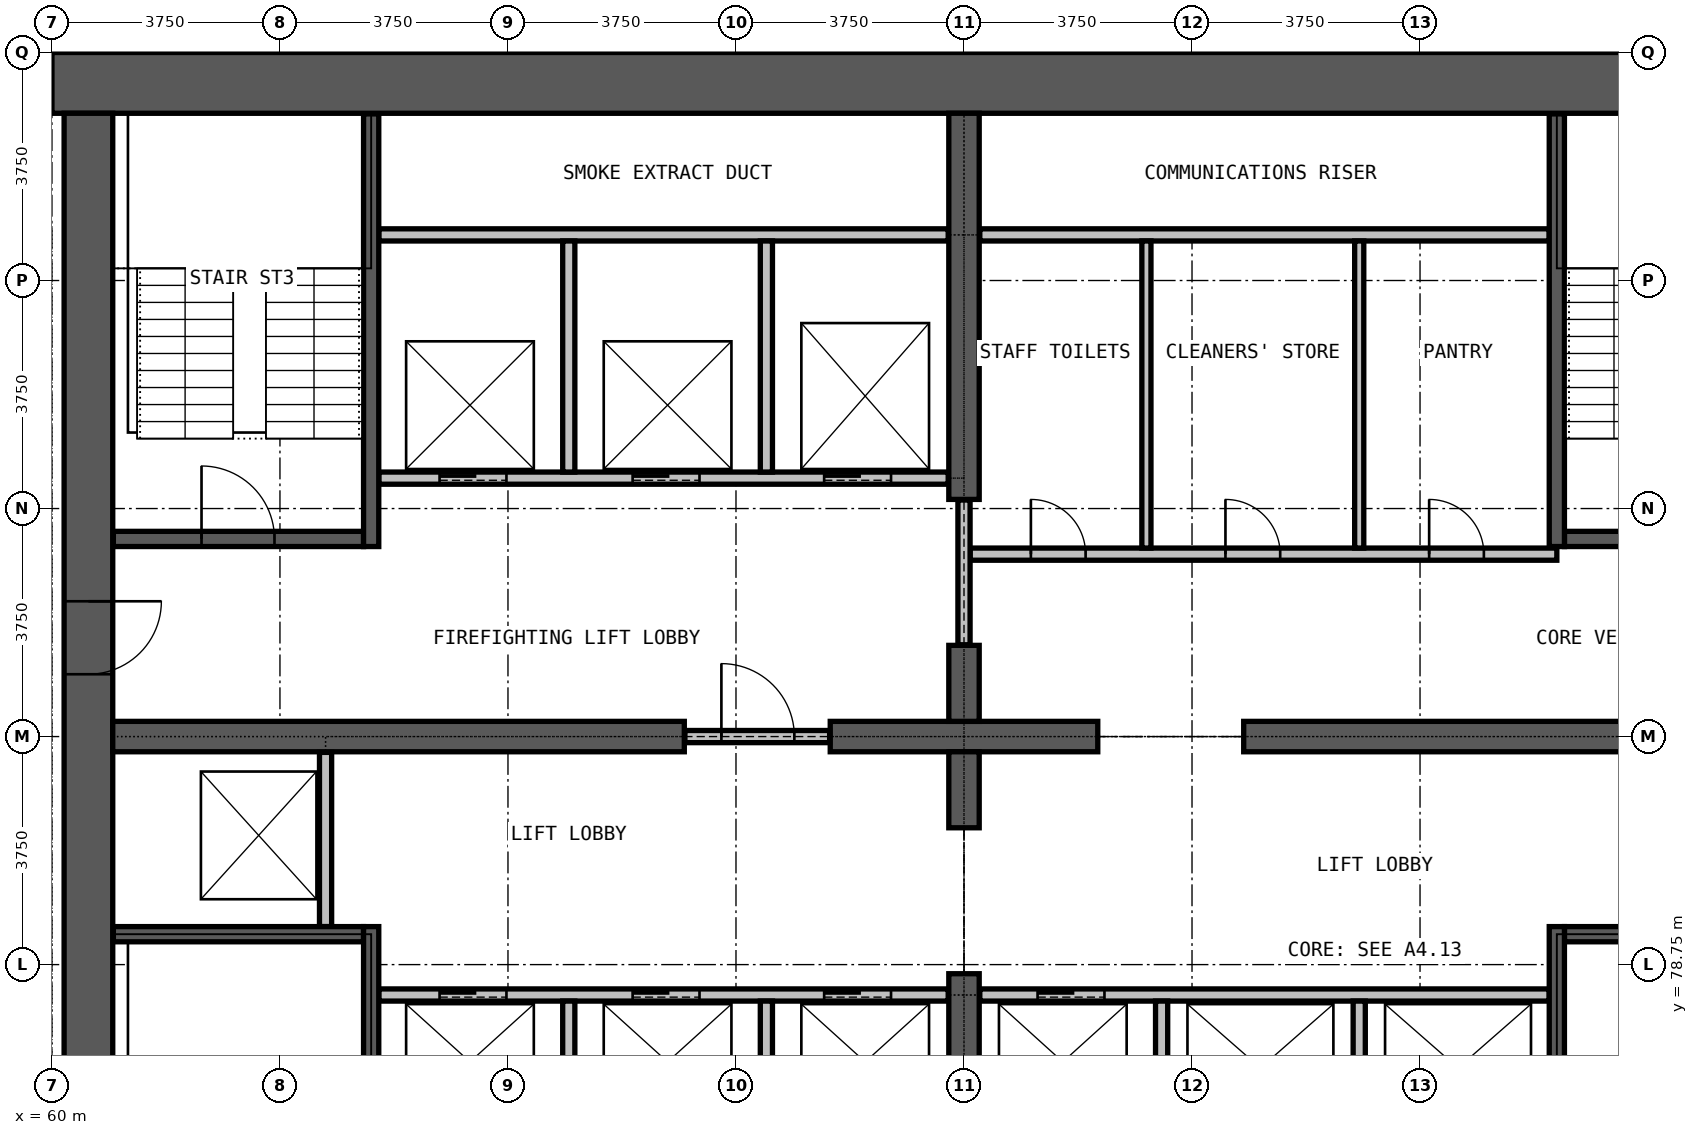
"""IFC4 building model, lengths in metres.
Left out: names, types, materials, properties, quantities, classifications, styles, units other than length and angle.
Written with IfcOpenShell. Run it as: python <this file> out.ifc"""

import sys

from ifc_helpers import new_model, si_unit, direction, frame, frame_2d, origin, place, context, subcontext, project, spatial, rectangle, extrude, element, fill, save


model = new_model("IFC4")
c1 = context("Model", 3, precision=1e-05, world=origin(), true_north=direction((0.0, 1.0)))
c2 = subcontext(c1, "Body", "Model", "MODEL_VIEW")
j1 = project(units=[si_unit("LENGTHUNIT", "METRE"), si_unit("PLANEANGLEUNIT", "RADIAN")], contexts=[c1])
p1 = place(None, origin())
s1 = spatial("IfcSite", under=j1, at=p1, CompositionType="ELEMENT")
p2 = place(p1, origin())
s2 = spatial("IfcBuilding", under=s1, at=p2, CompositionType="ELEMENT")
p3 = place(p2, frame((0.0, 0.0, 118.0)))
s3 = spatial("IfcBuildingStorey", under=s2, at=p3, CompositionType="ELEMENT", Elevation=118.0)
p4 = place(p3, frame((90.0, 93.25, 0.0), z_axis=(0.0, 0.0, 1.0), x_axis=(-1.0, 0.0, 0.0)))
e1 = element("IfcWall", 1, at=p4, inside=s3, PredefinedType="SHEAR", context=c2, shape_type="SweptSolid", body=[
    extrude(rectangle(XDim=30.0, YDim=1.0, at=frame_2d((15.0, 0.0))), origin(), (0.0, 0.0, 1.0), 3.6),
])
p5 = place(p3, frame((60.6, 92.75, 0.0), z_axis=(0.0, 0.0, 1.0), x_axis=(0.0, -1.0, 0.0)))
e2 = element("IfcWall", 2, at=p5, inside=s3, PredefinedType="SHEAR", context=c2, shape_type="SweptSolid", body=[
    extrude(rectangle(XDim=20.5, YDim=0.8, at=frame_2d((10.25, 0.0))), origin(), (0.0, 0.0, 1.0), 3.6),
])
p6 = place(p5, frame((19.025, 0.0, 0.0)))
e3 = element("IfcOpeningElement", 3, at=p6, cuts=e2, PredefinedType="OPENING", context=c2, shape_type="SweptSolid", body=[
    extrude(rectangle(XDim=1.2, YDim=2.2, at=frame_2d((0.6, 1.1))), frame((0.0, 0.41, 0.0), z_axis=(0.0, -1.0, 0.0), x_axis=(1.0, 0.0, 0.0)), (0.0, 0.0, 1.0), 0.82),
])
p7 = place(p5, frame((8.025, 0.0, 0.0)))
e4 = element("IfcOpeningElement", 4, at=p7, cuts=e2, PredefinedType="OPENING", context=c2, shape_type="SweptSolid", body=[
    extrude(rectangle(XDim=1.2, YDim=2.2, at=frame_2d((0.6, 1.1))), frame((0.0, 0.41, 0.0), z_axis=(0.0, -1.0, 0.0), x_axis=(1.0, 0.0, 0.0)), (0.0, 0.0, 1.0), 0.82),
])
p8 = place(p3, frame((61.0, 82.5, 0.0), z_axis=(0.0, 0.0, 1.0), x_axis=(1.0, 0.0, 0.0)))
e5 = element("IfcWall", 5, at=p8, inside=s3, PredefinedType="SHEAR", context=c2, shape_type="SweptSolid", body=[
    extrude(rectangle(XDim=9.4, YDim=0.5, at=frame_2d((4.7, 0.0))), origin(), (0.0, 0.0, 1.0), 3.6),
])
p9 = place(p3, frame((72.8, 82.5, 0.0), z_axis=(0.0, 0.0, 1.0), x_axis=(1.0, 0.0, 0.0)))
e6 = element("IfcWall", 6, at=p9, inside=s3, PredefinedType="SHEAR", context=c2, shape_type="SweptSolid", body=[
    extrude(rectangle(XDim=4.4, YDim=0.5, at=frame_2d((2.2, 0.0))), origin(), (0.0, 0.0, 1.0), 3.6),
])
p10 = place(p3, frame((79.6, 82.5, 0.0), z_axis=(0.0, 0.0, 1.0), x_axis=(1.0, 0.0, 0.0)))
e7 = element("IfcWall", 7, at=p10, inside=s3, PredefinedType="SHEAR", context=c2, shape_type="SweptSolid", body=[
    extrude(rectangle(XDim=9.4, YDim=0.5, at=frame_2d((4.7, 0.0))), origin(), (0.0, 0.0, 1.0), 3.6),
])
p11 = place(p3, frame((75.0, 72.25, 0.0), z_axis=(0.0, 0.0, 1.0), x_axis=(0.0, 1.0, 0.0)))
e8 = element("IfcWall", 8, at=p11, inside=s3, PredefinedType="SHEAR", context=c2, shape_type="SweptSolid", body=[
    extrude(rectangle(XDim=6.35, YDim=0.5, at=frame_2d((3.175, 0.0))), origin(), (0.0, 0.0, 1.0), 3.6),
])
for number, where, z_axis, x_axis in (
    (9, (75.0, 81.0, 0.0), (0.0, 0.0, 1.0), (0.0, 1.0, 0.0)),
    (10, (75.0, 82.75, 0.0), (0.0, 0.0, 1.0), (0.0, 1.0, 0.0)),
):
    element("IfcWall", number, at=place(p3, frame(where, z_axis=z_axis, x_axis=x_axis)), inside=s3, PredefinedType="SHEAR", context=c2, shape_type="SweptSolid", body=[
        extrude(rectangle(XDim=1.25, YDim=0.5, at=frame_2d((0.625, 0.0))), origin(), (0.0, 0.0, 1.0), 3.6),
    ])
p12 = place(p3, frame((75.0, 86.4, 0.0), z_axis=(0.0, 0.0, 1.0), x_axis=(0.0, 1.0, 0.0)))
e11 = element("IfcWall", 11, at=p12, inside=s3, PredefinedType="SHEAR", context=c2, shape_type="SweptSolid", body=[
    extrude(rectangle(XDim=6.35, YDim=0.5, at=frame_2d((3.175, 0.0))), origin(), (0.0, 0.0, 1.0), 3.6),
])
p13 = place(p3, frame((70.41, 82.5, 0.0), z_axis=(0.0, 0.0, 1.0), x_axis=(1.0, 0.0, 0.0)))
e12 = element("IfcWall", 12, at=p13, inside=s3, PredefinedType="PARTITIONING", context=c2, shape_type="SweptSolid", body=[
    extrude(rectangle(XDim=2.38, YDim=0.2, at=frame_2d((1.19, 0.0))), origin(), (0.0, 0.0, 1.0), 2.4),
])
p14 = place(p13, frame((0.6, 0.0, 0.0)))
e13 = element("IfcOpeningElement", 13, at=p14, cuts=e12, PredefinedType="OPENING", context=c2, shape_type="SweptSolid", body=[
    extrude(rectangle(XDim=1.2, YDim=2.2, at=frame_2d((0.6, 1.1))), frame((0.0, 0.11, 0.0), z_axis=(0.0, -1.0, 0.0), x_axis=(1.0, 0.0, 0.0)), (0.0, 0.0, 1.0), 0.22),
])
p15 = place(p3, frame((75.1, 85.5, 0.0), z_axis=(0.0, 0.0, 1.0), x_axis=(1.0, 0.0, 0.0)))
e14 = element("IfcWall", 14, at=p15, inside=s3, PredefinedType="PARTITIONING", context=c2, shape_type="SweptSolid", body=[
    extrude(rectangle(XDim=9.65, YDim=0.2, at=frame_2d((4.825, 0.0))), origin(), (0.0, 0.0, 1.0), 3.3),
])
p16 = place(p15, frame((1.0, 0.0, 0.0)))
e15 = element("IfcOpeningElement", 15, at=p16, cuts=e14, PredefinedType="OPENING", context=c2, shape_type="SweptSolid", body=[
    extrude(rectangle(XDim=0.9, YDim=2.2, at=frame_2d((0.45, 1.1))), frame((0.0, 0.11, 0.0), z_axis=(0.0, -1.0, 0.0), x_axis=(1.0, 0.0, 0.0)), (0.0, 0.0, 1.0), 0.22),
])
p17 = place(p15, frame((4.2, 0.0, 0.0)))
e16 = element("IfcOpeningElement", 16, at=p17, cuts=e14, PredefinedType="OPENING", context=c2, shape_type="SweptSolid", body=[
    extrude(rectangle(XDim=0.9, YDim=2.2, at=frame_2d((0.45, 1.1))), frame((0.0, 0.11, 0.0), z_axis=(0.0, -1.0, 0.0), x_axis=(1.0, 0.0, 0.0)), (0.0, 0.0, 1.0), 0.22),
])
p18 = place(p15, frame((7.55, 0.0, 0.0)))
e17 = element("IfcOpeningElement", 17, at=p18, cuts=e14, PredefinedType="OPENING", context=c2, shape_type="SweptSolid", body=[
    extrude(rectangle(XDim=0.9, YDim=2.2, at=frame_2d((0.45, 1.1))), frame((0.0, 0.11, 0.0), z_axis=(0.0, -1.0, 0.0), x_axis=(1.0, 0.0, 0.0)), (0.0, 0.0, 1.0), 0.22),
])
p19 = place(p3, frame((75.26, 90.75, 0.0), z_axis=(0.0, 0.0, 1.0), x_axis=(1.0, 0.0, 0.0)))
e18 = element("IfcWall", 18, at=p19, inside=s3, PredefinedType="PARTITIONING", context=c2, shape_type="SweptSolid", body=[
    extrude(rectangle(XDim=9.365, YDim=0.2, at=frame_2d((4.683, 0.0))), origin(), (0.0, 0.0, 1.0), 3.3),
])
p20 = place(p3, frame((75.0, 84.01, 0.0), z_axis=(0.0, 0.0, 1.0), x_axis=(0.0, 1.0, 0.0)))
e19 = element("IfcWall", 19, at=p20, inside=s3, PredefinedType="PARTITIONING", context=c2, shape_type="SweptSolid", body=[
    extrude(rectangle(XDim=2.38, YDim=0.2, at=frame_2d((1.19, 0.0))), origin(), (0.0, 0.0, 1.0), 2.4),
])
for number, where, z_axis, x_axis in (
    (20, (78.0, 85.6, 0.0), (0.0, 0.0, 1.0), (0.0, 1.0, 0.0)),
    (21, (81.5, 85.6, 0.0), (0.0, 0.0, 1.0), (0.0, 1.0, 0.0)),
):
    element("IfcWall", number, at=place(p3, frame(where, z_axis=z_axis, x_axis=x_axis)), inside=s3, PredefinedType="PARTITIONING", context=c2, shape_type="SweptSolid", body=[
        extrude(rectangle(XDim=5.05, YDim=0.15, at=frame_2d((2.525, 0.0))), origin(), (0.0, 0.0, 1.0), 3.3),
    ])
p21 = place(p3, frame((65.375, 78.25, 0.0), z_axis=(0.0, 0.0, 1.0), x_axis=(1.0, 0.0, 0.0)))
e22 = element("IfcWall", 22, at=p21, inside=s3, PredefinedType="PARTITIONING", context=c2, shape_type="SweptSolid", body=[
    extrude(rectangle(XDim=9.365, YDim=0.2, at=frame_2d((4.683, 0.0))), origin(), (0.0, 0.0, 1.0), 3.3),
])
p22 = place(p21, frame((1.0, 0.0, 0.0)))
e23 = element("IfcOpeningElement", 23, at=p22, cuts=e22, PredefinedType="OPENING", context=c2, shape_type="SweptSolid", body=[
    extrude(rectangle(XDim=1.1, YDim=2.2, at=frame_2d((0.55, 1.1))), frame((0.0, 0.11, 0.0), z_axis=(0.0, -1.0, 0.0), x_axis=(1.0, 0.0, 0.0)), (0.0, 0.0, 1.0), 0.22),
])
p23 = place(p21, frame((4.175, 0.0, 0.0)))
e24 = element("IfcOpeningElement", 24, at=p23, cuts=e22, PredefinedType="OPENING", context=c2, shape_type="SweptSolid", body=[
    extrude(rectangle(XDim=1.1, YDim=2.2, at=frame_2d((0.55, 1.1))), frame((0.0, 0.11, 0.0), z_axis=(0.0, -1.0, 0.0), x_axis=(1.0, 0.0, 0.0)), (0.0, 0.0, 1.0), 0.22),
])
p24 = place(p21, frame((7.325, 0.0, 0.0)))
e25 = element("IfcOpeningElement", 25, at=p24, cuts=e22, PredefinedType="OPENING", context=c2, shape_type="SweptSolid", body=[
    extrude(rectangle(XDim=1.1, YDim=2.2, at=frame_2d((0.55, 1.1))), frame((0.0, 0.11, 0.0), z_axis=(0.0, -1.0, 0.0), x_axis=(1.0, 0.0, 0.0)), (0.0, 0.0, 1.0), 0.22),
])
p25 = place(p3, frame((75.26, 78.25, 0.0), z_axis=(0.0, 0.0, 1.0), x_axis=(1.0, 0.0, 0.0)))
e26 = element("IfcWall", 26, at=p25, inside=s3, PredefinedType="PARTITIONING", context=c2, shape_type="SweptSolid", body=[
    extrude(rectangle(XDim=9.365, YDim=0.2, at=frame_2d((4.683, 0.0))), origin(), (0.0, 0.0, 1.0), 3.3),
])
p26 = place(p25, frame((0.95, 0.0, 0.0)))
e27 = element("IfcOpeningElement", 27, at=p26, cuts=e26, PredefinedType="OPENING", context=c2, shape_type="SweptSolid", body=[
    extrude(rectangle(XDim=1.1, YDim=2.2, at=frame_2d((0.55, 1.1))), frame((0.0, 0.11, 0.0), z_axis=(0.0, -1.0, 0.0), x_axis=(1.0, 0.0, 0.0)), (0.0, 0.0, 1.0), 0.22),
])
p27 = place(p3, frame((65.375, 86.75, 0.0), z_axis=(0.0, 0.0, 1.0), x_axis=(1.0, 0.0, 0.0)))
e28 = element("IfcWall", 28, at=p27, inside=s3, PredefinedType="PARTITIONING", context=c2, shape_type="SweptSolid", body=[
    extrude(rectangle(XDim=9.365, YDim=0.2, at=frame_2d((4.683, 0.0))), origin(), (0.0, 0.0, 1.0), 3.3),
])
p28 = place(p27, frame((1.0, 0.0, 0.0)))
e29 = element("IfcOpeningElement", 29, at=p28, cuts=e28, PredefinedType="OPENING", context=c2, shape_type="SweptSolid", body=[
    extrude(rectangle(XDim=1.1, YDim=2.2, at=frame_2d((0.55, 1.1))), frame((0.0, 0.11, 0.0), z_axis=(0.0, -1.0, 0.0), x_axis=(1.0, 0.0, 0.0)), (0.0, 0.0, 1.0), 0.22),
])
p29 = place(p27, frame((4.175, 0.0, 0.0)))
e30 = element("IfcOpeningElement", 30, at=p29, cuts=e28, PredefinedType="OPENING", context=c2, shape_type="SweptSolid", body=[
    extrude(rectangle(XDim=1.1, YDim=2.2, at=frame_2d((0.55, 1.1))), frame((0.0, 0.11, 0.0), z_axis=(0.0, -1.0, 0.0), x_axis=(1.0, 0.0, 0.0)), (0.0, 0.0, 1.0), 0.22),
])
p30 = place(p27, frame((7.325, 0.0, 0.0)))
e31 = element("IfcOpeningElement", 31, at=p30, cuts=e28, PredefinedType="OPENING", context=c2, shape_type="SweptSolid", body=[
    extrude(rectangle(XDim=1.1, YDim=2.2, at=frame_2d((0.55, 1.1))), frame((0.0, 0.11, 0.0), z_axis=(0.0, -1.0, 0.0), x_axis=(1.0, 0.0, 0.0)), (0.0, 0.0, 1.0), 0.22),
])
p31 = place(p3, frame((65.375, 90.75, 0.0), z_axis=(0.0, 0.0, 1.0), x_axis=(1.0, 0.0, 0.0)))
e32 = element("IfcWall", 32, at=p31, inside=s3, PredefinedType="PARTITIONING", context=c2, shape_type="SweptSolid", body=[
    extrude(rectangle(XDim=9.365, YDim=0.2, at=frame_2d((4.683, 0.0))), origin(), (0.0, 0.0, 1.0), 3.3),
])
p32 = place(p3, frame((64.5, 79.375, 0.0), z_axis=(0.0, 0.0, 1.0), x_axis=(0.0, 1.0, 0.0)))
e33 = element("IfcWall", 33, at=p32, inside=s3, PredefinedType="PARTITIONING", context=c2, shape_type="SweptSolid", body=[
    extrude(rectangle(XDim=2.865, YDim=0.2, at=frame_2d((1.433, 0.0))), origin(), (0.0, 0.0, 1.0), 3.3),
])
for number, where, z_axis, x_axis in (
    (34, (68.5, 74.35, 0.0), (0.0, 0.0, 1.0), (0.0, 1.0, 0.0)),
    (35, (68.5, 86.85, 0.0), (0.0, 0.0, 1.0), (0.0, 1.0, 0.0)),
    (36, (71.75, 74.35, 0.0), (0.0, 0.0, 1.0), (0.0, 1.0, 0.0)),
    (37, (71.75, 86.85, 0.0), (0.0, 0.0, 1.0), (0.0, 1.0, 0.0)),
    (38, (78.25, 74.35, 0.0), (0.0, 0.0, 1.0), (0.0, 1.0, 0.0)),
    (39, (81.5, 74.35, 0.0), (0.0, 0.0, 1.0), (0.0, 1.0, 0.0)),
):
    element("IfcWall", number, at=place(p3, frame(where, z_axis=z_axis, x_axis=x_axis)), inside=s3, PredefinedType="PARTITIONING", context=c2, shape_type="SweptSolid", body=[
        extrude(rectangle(XDim=3.8, YDim=0.2, at=frame_2d((1.9, 0.0))), origin(), (0.0, 0.0, 1.0), 3.3),
    ])
p33 = place(p3, frame((61.01, 79.25, 0.0), z_axis=(0.0, 0.0, 1.0), x_axis=(1.0, 0.0, 0.0)))
e40 = element("IfcWall", 40, at=p33, inside=s3, PredefinedType="PARTITIONING", context=c2, shape_type="SweptSolid", body=[
    extrude(rectangle(XDim=4.115, YDim=0.25, at=frame_2d((2.058, 0.0))), origin(), (0.0, 0.0, 1.0), 3.3),
])
p34 = place(p3, frame((84.875, 79.25, 0.0), z_axis=(0.0, 0.0, 1.0), x_axis=(1.0, 0.0, 0.0)))
e41 = element("IfcWall", 41, at=p34, inside=s3, PredefinedType="PARTITIONING", context=c2, shape_type="SweptSolid", body=[
    extrude(rectangle(XDim=4.125, YDim=0.25, at=frame_2d((2.062, 0.0))), origin(), (0.0, 0.0, 1.0), 3.3),
])
p35 = place(p3, frame((61.01, 85.75, 0.0), z_axis=(0.0, 0.0, 1.0), x_axis=(1.0, 0.0, 0.0)))
e42 = element("IfcWall", 42, at=p35, inside=s3, PredefinedType="PARTITIONING", context=c2, shape_type="SweptSolid", body=[
    extrude(rectangle(XDim=4.115, YDim=0.25, at=frame_2d((2.058, 0.0))), origin(), (0.0, 0.0, 1.0), 3.3),
])
p36 = place(p35, frame((1.45, 0.0, 0.0)))
e43 = element("IfcOpeningElement", 43, at=p36, cuts=e42, PredefinedType="OPENING", context=c2, shape_type="SweptSolid", body=[
    extrude(rectangle(XDim=1.2, YDim=2.2, at=frame_2d((0.6, 1.1))), frame((0.0, 0.135, 0.0), z_axis=(0.0, -1.0, 0.0), x_axis=(1.0, 0.0, 0.0)), (0.0, 0.0, 1.0), 0.27),
])
p37 = place(p3, frame((84.875, 85.75, 0.0), z_axis=(0.0, 0.0, 1.0), x_axis=(1.0, 0.0, 0.0)))
e44 = element("IfcWall", 44, at=p37, inside=s3, PredefinedType="PARTITIONING", context=c2, shape_type="SweptSolid", body=[
    extrude(rectangle(XDim=4.125, YDim=0.25, at=frame_2d((2.062, 0.0))), origin(), (0.0, 0.0, 1.0), 3.3),
])
p38 = place(p3, frame((65.25, 72.25, 0.0), z_axis=(0.0, 0.0, 1.0), x_axis=(0.0, 1.0, 0.0)))
e45 = element("IfcWall", 45, at=p38, inside=s3, PredefinedType="PARTITIONING", context=c2, shape_type="SweptSolid", body=[
    extrude(rectangle(XDim=7.125, YDim=0.25, at=frame_2d((3.562, 0.0))), origin(), (0.0, 0.0, 1.0), 3.3),
])
p39 = place(p3, frame((65.25, 85.625, 0.0), z_axis=(0.0, 0.0, 1.0), x_axis=(0.0, 1.0, 0.0)))
e46 = element("IfcWall", 46, at=p39, inside=s3, PredefinedType="PARTITIONING", context=c2, shape_type="SweptSolid", body=[
    extrude(rectangle(XDim=7.115, YDim=0.25, at=frame_2d((3.558, 0.0))), origin(), (0.0, 0.0, 1.0), 3.3),
])
p40 = place(p3, frame((84.75, 72.25, 0.0), z_axis=(0.0, 0.0, 1.0), x_axis=(0.0, 1.0, 0.0)))
e47 = element("IfcWall", 47, at=p40, inside=s3, PredefinedType="PARTITIONING", context=c2, shape_type="SweptSolid", body=[
    extrude(rectangle(XDim=7.125, YDim=0.25, at=frame_2d((3.562, 0.0))), origin(), (0.0, 0.0, 1.0), 3.3),
])
p41 = place(p3, frame((84.75, 85.625, 0.0), z_axis=(0.0, 0.0, 1.0), x_axis=(0.0, 1.0, 0.0)))
e48 = element("IfcWall", 48, at=p41, inside=s3, PredefinedType="PARTITIONING", context=c2, shape_type="SweptSolid", body=[
    extrude(rectangle(XDim=7.115, YDim=0.25, at=frame_2d((3.558, 0.0))), origin(), (0.0, 0.0, 1.0), 3.3),
])
p42 = place(p22, origin())
e49 = element("IfcDoor", 49, at=p42, inside=s3, OperationType="DOUBLE_DOOR_SLIDING", PredefinedType="DOOR", context=c2, shape_type="SweptSolid", body=[
    extrude(rectangle(XDim=1.1, YDim=2.2, at=frame_2d((0.55, 1.1))), frame((0.0, 0.025, 0.0), z_axis=(0.0, -1.0, 0.0), x_axis=(1.0, 0.0, 0.0)), (0.0, 0.0, 1.0), 0.05),
])
fill(e23, e49)
p43 = place(p23, origin())
e50 = element("IfcDoor", 50, at=p43, inside=s3, OperationType="DOUBLE_DOOR_SLIDING", PredefinedType="DOOR", context=c2, shape_type="SweptSolid", body=[
    extrude(rectangle(XDim=1.1, YDim=2.2, at=frame_2d((0.55, 1.1))), frame((0.0, 0.025, 0.0), z_axis=(0.0, -1.0, 0.0), x_axis=(1.0, 0.0, 0.0)), (0.0, 0.0, 1.0), 0.05),
])
fill(e24, e50)
p44 = place(p24, origin())
e51 = element("IfcDoor", 51, at=p44, inside=s3, OperationType="DOUBLE_DOOR_SLIDING", PredefinedType="DOOR", context=c2, shape_type="SweptSolid", body=[
    extrude(rectangle(XDim=1.1, YDim=2.2, at=frame_2d((0.55, 1.1))), frame((0.0, 0.025, 0.0), z_axis=(0.0, -1.0, 0.0), x_axis=(1.0, 0.0, 0.0)), (0.0, 0.0, 1.0), 0.05),
])
fill(e25, e51)
p45 = place(p26, origin())
e52 = element("IfcDoor", 52, at=p45, inside=s3, OperationType="DOUBLE_DOOR_SLIDING", PredefinedType="DOOR", context=c2, shape_type="SweptSolid", body=[
    extrude(rectangle(XDim=1.1, YDim=2.2, at=frame_2d((0.55, 1.1))), frame((0.0, 0.025, 0.0), z_axis=(0.0, -1.0, 0.0), x_axis=(1.0, 0.0, 0.0)), (0.0, 0.0, 1.0), 0.05),
])
fill(e27, e52)
p46 = place(p28, origin())
e53 = element("IfcDoor", 53, at=p46, inside=s3, OperationType="DOUBLE_DOOR_SLIDING", PredefinedType="DOOR", context=c2, shape_type="SweptSolid", body=[
    extrude(rectangle(XDim=1.1, YDim=2.2, at=frame_2d((0.55, 1.1))), frame((0.0, 0.025, 0.0), z_axis=(0.0, -1.0, 0.0), x_axis=(1.0, 0.0, 0.0)), (0.0, 0.0, 1.0), 0.05),
])
fill(e29, e53)
p47 = place(p29, origin())
e54 = element("IfcDoor", 54, at=p47, inside=s3, OperationType="DOUBLE_DOOR_SLIDING", PredefinedType="DOOR", context=c2, shape_type="SweptSolid", body=[
    extrude(rectangle(XDim=1.1, YDim=2.2, at=frame_2d((0.55, 1.1))), frame((0.0, 0.025, 0.0), z_axis=(0.0, -1.0, 0.0), x_axis=(1.0, 0.0, 0.0)), (0.0, 0.0, 1.0), 0.05),
])
fill(e30, e54)
p48 = place(p30, origin())
e55 = element("IfcDoor", 55, at=p48, inside=s3, OperationType="DOUBLE_DOOR_SLIDING", PredefinedType="DOOR", context=c2, shape_type="SweptSolid", body=[
    extrude(rectangle(XDim=1.1, YDim=2.2, at=frame_2d((0.55, 1.1))), frame((0.0, 0.025, 0.0), z_axis=(0.0, -1.0, 0.0), x_axis=(1.0, 0.0, 0.0)), (0.0, 0.0, 1.0), 0.05),
])
fill(e31, e55)
p49 = place(p14, origin())
e56 = element("IfcDoor", 56, at=p49, inside=s3, OperationType="SINGLE_SWING_RIGHT", PredefinedType="DOOR", context=c2, shape_type="SweptSolid", body=[
    extrude(rectangle(XDim=1.2, YDim=2.2, at=frame_2d((0.6, 1.1))), frame((0.0, 0.025, 0.0), z_axis=(0.0, -1.0, 0.0), x_axis=(1.0, 0.0, 0.0)), (0.0, 0.0, 1.0), 0.05),
])
fill(e13, e56)
p50 = place(p36, origin())
e57 = element("IfcDoor", 57, at=p50, inside=s3, OperationType="SINGLE_SWING_LEFT", PredefinedType="DOOR", context=c2, shape_type="SweptSolid", body=[
    extrude(rectangle(XDim=1.2, YDim=2.2, at=frame_2d((0.6, 1.1))), frame((0.0, 0.025, 0.0), z_axis=(0.0, -1.0, 0.0), x_axis=(1.0, 0.0, 0.0)), (0.0, 0.0, 1.0), 0.05),
])
fill(e43, e57)
p51 = place(p7, origin())
e58 = element("IfcDoor", 58, at=p51, inside=s3, OperationType="SINGLE_SWING_LEFT", PredefinedType="DOOR", context=c2, shape_type="SweptSolid", body=[
    extrude(rectangle(XDim=1.2, YDim=2.2, at=frame_2d((0.6, 1.1))), frame((0.0, 0.025, 0.0), z_axis=(0.0, -1.0, 0.0), x_axis=(1.0, 0.0, 0.0)), (0.0, 0.0, 1.0), 0.05),
])
fill(e4, e58)
p52 = place(p16, origin())
e59 = element("IfcDoor", 59, at=p52, inside=s3, OperationType="SINGLE_SWING_RIGHT", PredefinedType="DOOR", context=c2, shape_type="SweptSolid", body=[
    extrude(rectangle(XDim=0.9, YDim=2.2, at=frame_2d((0.45, 1.1))), frame((0.0, 0.025, 0.0), z_axis=(0.0, -1.0, 0.0), x_axis=(1.0, 0.0, 0.0)), (0.0, 0.0, 1.0), 0.05),
])
fill(e15, e59)
p53 = place(p17, origin())
e60 = element("IfcDoor", 60, at=p53, inside=s3, OperationType="SINGLE_SWING_LEFT", PredefinedType="DOOR", context=c2, shape_type="SweptSolid", body=[
    extrude(rectangle(XDim=0.9, YDim=2.2, at=frame_2d((0.45, 1.1))), frame((0.0, 0.025, 0.0), z_axis=(0.0, -1.0, 0.0), x_axis=(1.0, 0.0, 0.0)), (0.0, 0.0, 1.0), 0.05),
])
fill(e16, e60)
p54 = place(p18, origin())
e61 = element("IfcDoor", 61, at=p54, inside=s3, OperationType="SINGLE_SWING_RIGHT", PredefinedType="DOOR", context=c2, shape_type="SweptSolid", body=[
    extrude(rectangle(XDim=0.9, YDim=2.2, at=frame_2d((0.45, 1.1))), frame((0.0, 0.025, 0.0), z_axis=(0.0, -1.0, 0.0), x_axis=(1.0, 0.0, 0.0)), (0.0, 0.0, 1.0), 0.05),
])
fill(e17, e61)
save(model, sys.argv[1])
